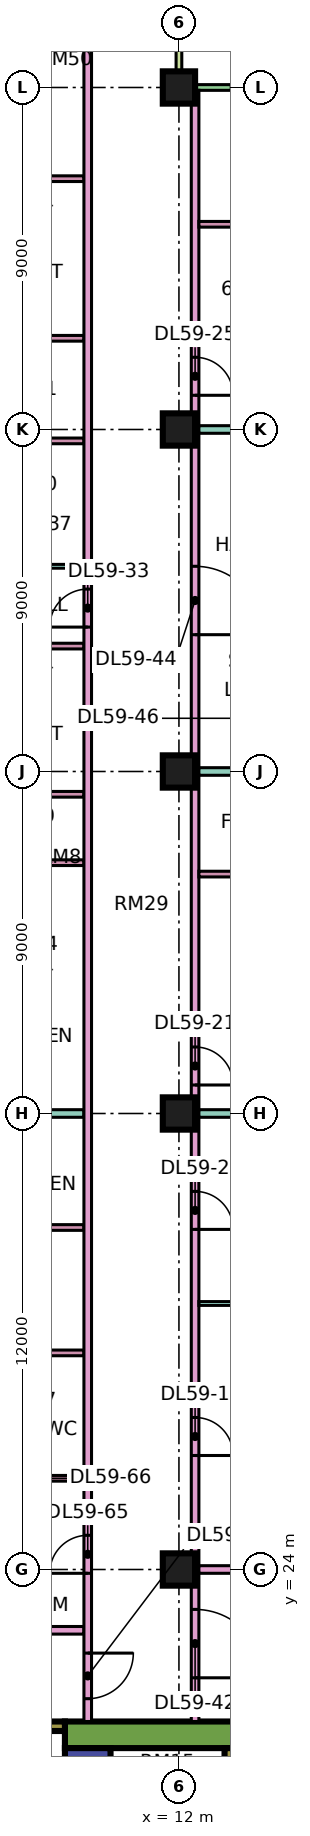
"""IFC4 building model, lengths in metres.
Left out: names, types, materials, properties, quantities, classifications, styles, units other than length and angle.
Written with IfcOpenShell. Run it as: python <this file> out.ifc"""

import sys

from ifc_helpers import new_model, si_unit, direction, frame, frame_2d, origin, origin_2d, place, context, subcontext, project, spatial, rectangle, extrude, element, fill, save


model = new_model("IFC4")
c1 = context("Model", 3, precision=1e-05, world=origin(), true_north=direction((0.0, 1.0)))
c2 = subcontext(c1, "Body", "Model", "MODEL_VIEW")
j1 = project(units=[si_unit("LENGTHUNIT", "METRE"), si_unit("PLANEANGLEUNIT", "RADIAN")], contexts=[c1])
p1 = place(None, origin())
s1 = spatial("IfcSite", under=j1, at=p1, CompositionType="ELEMENT")
p2 = place(p1, origin())
s2 = spatial("IfcBuilding", under=s1, at=p2, CompositionType="ELEMENT")
p3 = place(p2, frame((0.0, 0.0, 249.15)))
s3 = spatial("IfcBuildingStorey", under=s2, at=p3, CompositionType="ELEMENT", Elevation=249.15)
for number, where, z_axis, x_axis in (
    (1, (12.0, 24.0, 0.0), (0.0, 0.0, 1.0), (1.0, 0.0, 0.0)),
    (2, (12.0, 36.0, 0.0), (0.0, 0.0, 1.0), (1.0, 0.0, 0.0)),
    (3, (12.0, 45.0, 0.0), (0.0, 0.0, 1.0), (1.0, 0.0, 0.0)),
    (4, (12.0, 54.0, 0.0), (0.0, 0.0, 1.0), (1.0, 0.0, 0.0)),
    (5, (12.0, 63.0, 0.0), (0.0, 0.0, 1.0), (1.0, 0.0, 0.0)),
):
    element("IfcColumn", number, at=place(p3, frame(where, z_axis=z_axis, x_axis=x_axis)), inside=s3, PredefinedType="COLUMN", context=c2, shape_type="SweptSolid", body=[
        extrude(rectangle(XDim=0.85, YDim=0.85, at=origin_2d()), origin(), (0.0, 0.0, 1.0), 3.75),
    ])
p4 = place(p3, frame((9.0, 19.65, 0.0), z_axis=(0.0, 0.0, 1.0), x_axis=(1.0, 0.0, 0.0)))
e6 = element("IfcWall", 6, at=p4, inside=s3, PredefinedType="SHEAR", context=c2, shape_type="SweptSolid", body=[
    extrude(rectangle(XDim=25.0, YDim=0.7, at=frame_2d((12.5, 0.0))), origin(), (0.0, 0.0, 1.0), 3.75),
])
p5 = place(p4, frame((19.1, 0.0, 0.0)))
e7 = element("IfcOpeningElement", 7, at=p5, cuts=e6, PredefinedType="OPENING", context=c2, shape_type="SweptSolid", body=[
    extrude(rectangle(XDim=1.8, YDim=2.4, at=frame_2d((0.9, 1.2))), frame((0.0, 0.36, 0.0), z_axis=(0.0, -1.0, 0.0), x_axis=(1.0, 0.0, 0.0)), (0.0, 0.0, 1.0), 0.72),
])
p6 = place(p3, frame((9.6, 7.7, 0.0), z_axis=(0.0, 0.0, 1.0), x_axis=(0.0, 1.0, 0.0)))
e8 = element("IfcWall", 8, at=p6, inside=s3, PredefinedType="SHEAR", context=c2, shape_type="SweptSolid", body=[
    extrude(rectangle(XDim=11.6, YDim=1.2, at=frame_2d((5.8, 0.0))), origin(), (0.0, 0.0, 1.0), 3.75),
])
p7 = place(p6, frame((4.175, 0.0, 0.0)))
e9 = element("IfcOpeningElement", 9, at=p7, cuts=e8, PredefinedType="OPENING", context=c2, shape_type="SweptSolid", body=[
    extrude(rectangle(XDim=1.1, YDim=2.2, at=frame_2d((0.55, 1.1))), frame((0.0, 0.61, 0.0), z_axis=(0.0, -1.0, 0.0), x_axis=(1.0, 0.0, 0.0)), (0.0, 0.0, 1.0), 1.22),
])
p8 = place(p6, frame((6.675, 0.0, 0.0)))
e10 = element("IfcOpeningElement", 10, at=p8, cuts=e8, PredefinedType="OPENING", context=c2, shape_type="SweptSolid", body=[
    extrude(rectangle(XDim=1.1, YDim=2.2, at=frame_2d((0.55, 1.1))), frame((0.0, 0.61, 0.0), z_axis=(0.0, -1.0, 0.0), x_axis=(1.0, 0.0, 0.0)), (0.0, 0.0, 1.0), 1.22),
])
p9 = place(p6, frame((9.55, 0.0, 0.0)))
e11 = element("IfcOpeningElement", 11, at=p9, cuts=e8, PredefinedType="OPENING", context=c2, shape_type="SweptSolid", body=[
    extrude(rectangle(XDim=1.1, YDim=2.2, at=frame_2d((0.55, 1.1))), frame((0.0, 0.61, 0.0), z_axis=(0.0, -1.0, 0.0), x_axis=(1.0, 0.0, 0.0)), (0.0, 0.0, 1.0), 1.22),
])
p10 = place(p6, frame((1.85, 0.0, 0.0)))
e12 = element("IfcOpeningElement", 12, at=p10, cuts=e8, PredefinedType="OPENING", context=c2, shape_type="SweptSolid", body=[
    extrude(rectangle(XDim=0.9, YDim=2.1, at=frame_2d((0.45, 1.05))), frame((0.0, 0.61, 0.0), z_axis=(0.0, -1.0, 0.0), x_axis=(1.0, 0.0, 0.0)), (0.0, 0.0, 1.0), 1.22),
])
p11 = place(p3, frame((13.325, 7.7, 0.0), z_axis=(0.0, 0.0, 1.0), x_axis=(0.0, 1.0, 0.0)))
e13 = element("IfcWall", 13, at=p11, inside=s3, PredefinedType="SHEAR", context=c2, shape_type="SweptSolid", body=[
    extrude(rectangle(XDim=11.6, YDim=0.25, at=frame_2d((5.8, 0.0))), origin(), (0.0, 0.0, 1.0), 3.75),
])
p12 = place(p3, frame((2.1, 19.875, 0.0), z_axis=(0.0, 0.0, 1.0), x_axis=(1.0, 0.0, 0.0)))
e14 = element("IfcWall", 14, at=p12, inside=s3, PredefinedType="SHEAR", context=c2, shape_type="SweptSolid", body=[
    extrude(rectangle(XDim=6.9, YDim=0.25, at=frame_2d((3.45, 0.0))), origin(), (0.0, 0.0, 1.0), 3.75),
])
p13 = place(p12, frame((1.175, 0.0, 0.0)))
e15 = element("IfcOpeningElement", 15, at=p13, cuts=e14, PredefinedType="OPENING", context=c2, shape_type="SweptSolid", body=[
    extrude(rectangle(XDim=1.1, YDim=2.2, at=frame_2d((0.55, 1.1))), frame((0.0, 0.135, 0.0), z_axis=(0.0, -1.0, 0.0), x_axis=(1.0, 0.0, 0.0)), (0.0, 0.0, 1.0), 0.27),
])
p14 = place(p12, frame((4.6, 0.0, 0.0)))
e16 = element("IfcOpeningElement", 16, at=p14, cuts=e14, PredefinedType="OPENING", context=c2, shape_type="SweptSolid", body=[
    extrude(rectangle(XDim=1.2, YDim=2.2, at=frame_2d((0.6, 1.1))), frame((0.0, 0.135, 0.0), z_axis=(0.0, -1.0, 0.0), x_axis=(1.0, 0.0, 0.0)), (0.0, 0.0, 1.0), 0.27),
])
p15 = place(p3, frame((22.425, 63.0, 0.0), z_axis=(0.0, 0.0, 1.0), x_axis=(-1.0, 0.0, 0.0)))
e17 = element("IfcWall", 17, at=p15, inside=s3, PredefinedType="SOLIDWALL", context=c2, shape_type="SweptSolid", body=[
    extrude(rectangle(XDim=10.35, YDim=0.15, at=frame_2d((5.175, 0.0))), origin(), (0.0, 0.0, 1.0), 3.35),
])
p16 = place(p15, frame((1.7, 0.0, 0.0)))
e18 = element("IfcOpeningElement", 18, at=p16, cuts=e17, PredefinedType="OPENING", context=c2, shape_type="SweptSolid", body=[
    extrude(rectangle(XDim=1.8, YDim=2.4, at=frame_2d((0.9, 1.2))), frame((0.0, 0.085, 0.0), z_axis=(0.0, -1.0, 0.0), x_axis=(1.0, 0.0, 0.0)), (0.0, 0.0, 1.0), 0.17),
])
p17 = place(p15, frame((6.05, 0.0, 0.45)))
e19 = element("IfcOpeningElement", 19, at=p17, cuts=e17, PredefinedType="OPENING", context=c2, shape_type="SweptSolid", body=[
    extrude(rectangle(XDim=3.0, YDim=2.4, at=frame_2d((1.5, 1.2))), frame((0.0, 0.085, 0.0), z_axis=(0.0, -1.0, 0.0), x_axis=(1.0, 0.0, 0.0)), (0.0, 0.0, 1.0), 0.17),
])
p18 = place(p3, frame((12.0, 64.5, 0.0), z_axis=(0.0, 0.0, 1.0), x_axis=(0.0, -1.0, 0.0)))
e20 = element("IfcWall", 20, at=p18, inside=s3, PredefinedType="SOLIDWALL", context=c2, shape_type="SweptSolid", body=[
    extrude(rectangle(XDim=1.5, YDim=0.15, at=frame_2d((0.75, 0.0))), origin(), (0.0, 0.0, 1.0), 3.35),
])
p19 = place(p3, frame((0.074, 22.4, 0.0), z_axis=(0.0, 0.0, 1.0), x_axis=(1.0, 0.0, 0.0)))
e21 = element("IfcWall", 21, at=p19, inside=s3, PredefinedType="PARTITIONING", context=c2, shape_type="SweptSolid", body=[
    extrude(rectangle(XDim=9.426, YDim=0.2, at=frame_2d((4.713, 0.0))), origin(), (0.0, 0.0, 1.0), 3.35),
])
p20 = place(p3, frame((6.375, 26.4, 0.0), z_axis=(0.0, 0.0, 1.0), x_axis=(1.0, 0.0, 0.0)))
e22 = element("IfcWall", 22, at=p20, inside=s3, PredefinedType="PARTITIONING", context=c2, shape_type="SweptSolid", body=[
    extrude(rectangle(XDim=3.125, YDim=0.15, at=frame_2d((1.562, 0.0))), origin(), (0.0, 0.0, 1.0), 3.35),
])
p21 = place(p20, frame((1.225, 0.0, 0.0)))
e23 = element("IfcOpeningElement", 23, at=p21, cuts=e22, PredefinedType="OPENING", context=c2, shape_type="SweptSolid", body=[
    extrude(rectangle(XDim=0.8, YDim=2.1, at=frame_2d((0.4, 1.05))), frame((0.0, 0.085, 0.0), z_axis=(0.0, -1.0, 0.0), x_axis=(1.0, 0.0, 0.0)), (0.0, 0.0, 1.0), 0.17),
])
for number, where, z_axis, x_axis in (
    (24, (6.375, 29.7, 0.0), (0.0, 0.0, 1.0), (1.0, 0.0, 0.0)),
    (25, (6.375, 33.0, 0.0), (0.0, 0.0, 1.0), (1.0, 0.0, 0.0)),
):
    element("IfcWall", number, at=place(p3, frame(where, z_axis=z_axis, x_axis=x_axis)), inside=s3, PredefinedType="PARTITIONING", context=c2, shape_type="SweptSolid", body=[
        extrude(rectangle(XDim=3.125, YDim=0.15, at=frame_2d((1.562, 0.0))), origin(), (0.0, 0.0, 1.0), 3.35),
    ])
p22 = place(p3, frame((6.525, 36.0, 0.0), z_axis=(0.0, 0.0, 1.0), x_axis=(1.0, 0.0, 0.0)))
e26 = element("IfcWall", 26, at=p22, inside=s3, PredefinedType="PARTITIONING", context=c2, shape_type="SweptSolid", body=[
    extrude(rectangle(XDim=2.975, YDim=0.2, at=frame_2d((1.488, 0.0))), origin(), (0.0, 0.0, 1.0), 3.35),
])
for number, where, z_axis, x_axis in (
    (27, (6.675, 42.6, 0.0), (0.0, 0.0, 1.0), (1.0, 0.0, 0.0)),
    (28, (6.675, 44.4, 0.0), (0.0, 0.0, 1.0), (1.0, 0.0, 0.0)),
    (29, (6.675, 48.3, 0.0), (0.0, 0.0, 1.0), (1.0, 0.0, 0.0)),
):
    element("IfcWall", number, at=place(p3, frame(where, z_axis=z_axis, x_axis=x_axis)), inside=s3, PredefinedType="PARTITIONING", context=c2, shape_type="SweptSolid", body=[
        extrude(rectangle(XDim=2.825, YDim=0.15, at=frame_2d((1.413, 0.0))), origin(), (0.0, 0.0, 1.0), 3.35),
    ])
p23 = place(p3, frame((6.675, 50.4, 0.0), z_axis=(0.0, 0.0, 1.0), x_axis=(1.0, 0.0, 0.0)))
e30 = element("IfcWall", 30, at=p23, inside=s3, PredefinedType="PARTITIONING", context=c2, shape_type="SweptSolid", body=[
    extrude(rectangle(XDim=2.825, YDim=0.1, at=frame_2d((1.413, 0.0))), origin(), (0.0, 0.0, 1.0), 3.35),
])
p24 = place(p23, frame((0.975, 0.0, 0.0)))
e31 = element("IfcOpeningElement", 31, at=p24, cuts=e30, PredefinedType="OPENING", context=c2, shape_type="SweptSolid", body=[
    extrude(rectangle(XDim=0.9, YDim=2.1, at=frame_2d((0.45, 1.05))), frame((0.0, 0.06, 0.0), z_axis=(0.0, -1.0, 0.0), x_axis=(1.0, 0.0, 0.0)), (0.0, 0.0, 1.0), 0.12),
])
for number, where, z_axis, x_axis in (
    (32, (6.675, 53.7, 0.0), (0.0, 0.0, 1.0), (1.0, 0.0, 0.0)),
    (33, (6.675, 56.4, 0.0), (0.0, 0.0, 1.0), (1.0, 0.0, 0.0)),
    (34, (6.675, 60.6, 0.0), (0.0, 0.0, 1.0), (1.0, 0.0, 0.0)),
):
    element("IfcWall", number, at=place(p3, frame(where, z_axis=z_axis, x_axis=x_axis)), inside=s3, PredefinedType="PARTITIONING", context=c2, shape_type="SweptSolid", body=[
        extrude(rectangle(XDim=2.825, YDim=0.15, at=frame_2d((1.413, 0.0))), origin(), (0.0, 0.0, 1.0), 3.35),
    ])
p25 = place(p3, frame((9.6, 20.0, 0.0), z_axis=(0.0, 0.0, 1.0), x_axis=(0.0, 1.0, 0.0)))
e35 = element("IfcWall", 35, at=p25, inside=s3, PredefinedType="PARTITIONING", context=c2, shape_type="SweptSolid", body=[
    extrude(rectangle(XDim=44.35, YDim=0.2, at=frame_2d((22.175, 0.0))), origin(), (0.0, 0.0, 1.0), 3.35),
])
p26 = place(p25, frame((28.8, 0.0, 0.0)))
e36 = element("IfcOpeningElement", 36, at=p26, cuts=e35, PredefinedType="OPENING", context=c2, shape_type="SweptSolid", body=[
    extrude(rectangle(XDim=1.0, YDim=2.1, at=frame_2d((0.5, 1.05))), frame((0.0, 0.11, 0.0), z_axis=(0.0, -1.0, 0.0), x_axis=(1.0, 0.0, 0.0)), (0.0, 0.0, 1.0), 0.22),
])
p27 = place(p25, frame((0.6, 0.0, 0.0)))
e37 = element("IfcOpeningElement", 37, at=p27, cuts=e35, PredefinedType="OPENING", context=c2, shape_type="SweptSolid", body=[
    extrude(rectangle(XDim=1.2, YDim=2.1, at=frame_2d((0.6, 1.05))), frame((0.0, 0.11, 0.0), z_axis=(0.0, -1.0, 0.0), x_axis=(1.0, 0.0, 0.0)), (0.0, 0.0, 1.0), 0.22),
])
p28 = place(p25, frame((3.9, 0.0, 0.0)))
e38 = element("IfcOpeningElement", 38, at=p28, cuts=e35, PredefinedType="OPENING", context=c2, shape_type="SweptSolid", body=[
    extrude(rectangle(XDim=1.0, YDim=2.1, at=frame_2d((0.5, 1.05))), frame((0.0, 0.11, 0.0), z_axis=(0.0, -1.0, 0.0), x_axis=(1.0, 0.0, 0.0)), (0.0, 0.0, 1.0), 0.22),
])
p29 = place(p3, frame((12.425, 20.0, 0.0), z_axis=(0.0, 0.0, 1.0), x_axis=(0.0, 1.0, 0.0)))
e39 = element("IfcWall", 39, at=p29, inside=s3, PredefinedType="PARTITIONING", context=c2, shape_type="SweptSolid", body=[
    extrude(rectangle(XDim=42.926, YDim=0.2, at=frame_2d((21.463, 0.0))), origin(), (0.0, 0.0, 1.0), 3.35),
])
p30 = place(p29, frame((7.0, 0.0, 0.0)))
e40 = element("IfcOpeningElement", 40, at=p30, cuts=e39, PredefinedType="OPENING", context=c2, shape_type="SweptSolid", body=[
    extrude(rectangle(XDim=1.0, YDim=2.1, at=frame_2d((0.5, 1.05))), frame((0.0, 0.11, 0.0), z_axis=(0.0, -1.0, 0.0), x_axis=(1.0, 0.0, 0.0)), (0.0, 0.0, 1.0), 0.22),
])
p31 = place(p29, frame((12.95, 0.0, 0.0)))
e41 = element("IfcOpeningElement", 41, at=p31, cuts=e39, PredefinedType="OPENING", context=c2, shape_type="SweptSolid", body=[
    extrude(rectangle(XDim=1.0, YDim=2.1, at=frame_2d((0.5, 1.05))), frame((0.0, 0.11, 0.0), z_axis=(0.0, -1.0, 0.0), x_axis=(1.0, 0.0, 0.0)), (0.0, 0.0, 1.0), 0.22),
])
p32 = place(p29, frame((16.75, 0.0, 0.0)))
e42 = element("IfcOpeningElement", 42, at=p32, cuts=e39, PredefinedType="OPENING", context=c2, shape_type="SweptSolid", body=[
    extrude(rectangle(XDim=1.0, YDim=2.1, at=frame_2d((0.5, 1.05))), frame((0.0, 0.11, 0.0), z_axis=(0.0, -1.0, 0.0), x_axis=(1.0, 0.0, 0.0)), (0.0, 0.0, 1.0), 0.22),
])
p33 = place(p29, frame((34.9, 0.0, 0.0)))
e43 = element("IfcOpeningElement", 43, at=p33, cuts=e39, PredefinedType="OPENING", context=c2, shape_type="SweptSolid", body=[
    extrude(rectangle(XDim=1.0, YDim=2.1, at=frame_2d((0.5, 1.05))), frame((0.0, 0.11, 0.0), z_axis=(0.0, -1.0, 0.0), x_axis=(1.0, 0.0, 0.0)), (0.0, 0.0, 1.0), 0.22),
])
p34 = place(p29, frame((1.15, 0.0, 0.0)))
e44 = element("IfcOpeningElement", 44, at=p34, cuts=e39, PredefinedType="OPENING", context=c2, shape_type="SweptSolid", body=[
    extrude(rectangle(XDim=1.8, YDim=2.1, at=frame_2d((0.9, 1.05))), frame((0.0, 0.11, 0.0), z_axis=(0.0, -1.0, 0.0), x_axis=(1.0, 0.0, 0.0)), (0.0, 0.0, 1.0), 0.22),
])
p35 = place(p29, frame((28.6, 0.0, 0.0)))
e45 = element("IfcOpeningElement", 45, at=p35, cuts=e39, PredefinedType="OPENING", context=c2, shape_type="SweptSolid", body=[
    extrude(rectangle(XDim=1.8, YDim=2.1, at=frame_2d((0.9, 1.05))), frame((0.0, 0.11, 0.0), z_axis=(0.0, -1.0, 0.0), x_axis=(1.0, 0.0, 0.0)), (0.0, 0.0, 1.0), 0.22),
])
p36 = place(p3, frame((12.525, 24.0, 0.0), z_axis=(0.0, 0.0, 1.0), x_axis=(1.0, 0.0, 0.0)))
e46 = element("IfcWall", 46, at=p36, inside=s3, PredefinedType="PARTITIONING", context=c2, shape_type="SweptSolid", body=[
    extrude(rectangle(XDim=8.975, YDim=0.2, at=frame_2d((4.488, 0.0))), origin(), (0.0, 0.0, 1.0), 3.35),
])
p37 = place(p3, frame((12.525, 31.0, 0.0), z_axis=(0.0, 0.0, 1.0), x_axis=(1.0, 0.0, 0.0)))
e47 = element("IfcWall", 47, at=p37, inside=s3, PredefinedType="PARTITIONING", context=c2, shape_type="SweptSolid", body=[
    extrude(rectangle(XDim=8.975, YDim=0.1, at=frame_2d((4.488, 0.0))), origin(), (0.0, 0.0, 1.0), 3.35),
])
p38 = place(p3, frame((12.525, 36.0, 0.0), z_axis=(0.0, 0.0, 1.0), x_axis=(1.0, 0.0, 0.0)))
e48 = element("IfcWall", 48, at=p38, inside=s3, PredefinedType="PARTITIONING", context=c2, shape_type="SweptSolid", body=[
    extrude(rectangle(XDim=11.475, YDim=0.2, at=frame_2d((5.738, 0.0))), origin(), (0.0, 0.0, 1.0), 3.35),
])
for number, where, z_axis, x_axis in (
    (49, (12.525, 38.4, 0.0), (0.0, 0.0, 1.0), (1.0, 0.0, 0.0)),
    (50, (12.525, 42.3, 0.0), (0.0, 0.0, 1.0), (1.0, 0.0, 0.0)),
):
    element("IfcWall", number, at=place(p3, frame(where, z_axis=z_axis, x_axis=x_axis)), inside=s3, PredefinedType="PARTITIONING", context=c2, shape_type="SweptSolid", body=[
        extrude(rectangle(XDim=5.225, YDim=0.15, at=frame_2d((2.613, 0.0))), origin(), (0.0, 0.0, 1.0), 3.35),
    ])
p39 = place(p3, frame((12.525, 45.0, 0.0), z_axis=(0.0, 0.0, 1.0), x_axis=(1.0, 0.0, 0.0)))
e51 = element("IfcWall", 51, at=p39, inside=s3, PredefinedType="PARTITIONING", context=c2, shape_type="SweptSolid", body=[
    extrude(rectangle(XDim=11.401, YDim=0.2, at=frame_2d((5.701, 0.0))), origin(), (0.0, 0.0, 1.0), 3.35),
])
p40 = place(p3, frame((12.525, 54.0, 0.0), z_axis=(0.0, 0.0, 1.0), x_axis=(1.0, 0.0, 0.0)))
e52 = element("IfcWall", 52, at=p40, inside=s3, PredefinedType="PARTITIONING", context=c2, shape_type="SweptSolid", body=[
    extrude(rectangle(XDim=11.475, YDim=0.2, at=frame_2d((5.738, 0.0))), origin(), (0.0, 0.0, 1.0), 3.35),
])
for number, where, z_axis, x_axis in (
    (53, (12.525, 56.7, 0.0), (0.0, 0.0, 1.0), (1.0, 0.0, 0.0)),
    (54, (12.525, 59.4, 0.0), (0.0, 0.0, 1.0), (1.0, 0.0, 0.0)),
):
    element("IfcWall", number, at=place(p3, frame(where, z_axis=z_axis, x_axis=x_axis)), inside=s3, PredefinedType="PARTITIONING", context=c2, shape_type="SweptSolid", body=[
        extrude(rectangle(XDim=4.625, YDim=0.15, at=frame_2d((2.312, 0.0))), origin(), (0.0, 0.0, 1.0), 3.35),
    ])
p41 = place(p30, frame((1.0, 0.0, 0.0), z_axis=(0.0, 0.0, 1.0), x_axis=(-1.0, 0.0, 0.0)))
e55 = element("IfcDoor", 55, at=p41, inside=s3, OperationType="SINGLE_SWING_LEFT", PredefinedType="DOOR", context=c2, shape_type="SweptSolid", body=[
    extrude(rectangle(XDim=1.0, YDim=2.1, at=frame_2d((0.5, 1.05))), frame((0.0, 0.025, 0.0), z_axis=(0.0, -1.0, 0.0), x_axis=(1.0, 0.0, 0.0)), (0.0, 0.0, 1.0), 0.05),
])
fill(e40, e55)
p42 = place(p31, frame((1.0, 0.0, 0.0), z_axis=(0.0, 0.0, 1.0), x_axis=(-1.0, 0.0, 0.0)))
e56 = element("IfcDoor", 56, at=p42, inside=s3, OperationType="SINGLE_SWING_LEFT", PredefinedType="DOOR", context=c2, shape_type="SweptSolid", body=[
    extrude(rectangle(XDim=1.0, YDim=2.1, at=frame_2d((0.5, 1.05))), frame((0.0, 0.025, 0.0), z_axis=(0.0, -1.0, 0.0), x_axis=(1.0, 0.0, 0.0)), (0.0, 0.0, 1.0), 0.05),
])
fill(e41, e56)
p43 = place(p32, frame((1.0, 0.0, 0.0), z_axis=(0.0, 0.0, 1.0), x_axis=(-1.0, 0.0, 0.0)))
e57 = element("IfcDoor", 57, at=p43, inside=s3, OperationType="SINGLE_SWING_LEFT", PredefinedType="DOOR", context=c2, shape_type="SweptSolid", body=[
    extrude(rectangle(XDim=1.0, YDim=2.1, at=frame_2d((0.5, 1.05))), frame((0.0, 0.025, 0.0), z_axis=(0.0, -1.0, 0.0), x_axis=(1.0, 0.0, 0.0)), (0.0, 0.0, 1.0), 0.05),
])
fill(e42, e57)
p44 = place(p33, frame((1.0, 0.0, 0.0), z_axis=(0.0, 0.0, 1.0), x_axis=(-1.0, 0.0, 0.0)))
e58 = element("IfcDoor", 58, at=p44, inside=s3, OperationType="SINGLE_SWING_LEFT", PredefinedType="DOOR", context=c2, shape_type="SweptSolid", body=[
    extrude(rectangle(XDim=1.0, YDim=2.1, at=frame_2d((0.5, 1.05))), frame((0.0, 0.025, 0.0), z_axis=(0.0, -1.0, 0.0), x_axis=(1.0, 0.0, 0.0)), (0.0, 0.0, 1.0), 0.05),
])
fill(e43, e58)
p45 = place(p26, origin())
e59 = element("IfcDoor", 59, at=p45, inside=s3, OperationType="SINGLE_SWING_LEFT", PredefinedType="DOOR", context=c2, shape_type="SweptSolid", body=[
    extrude(rectangle(XDim=1.0, YDim=2.1, at=frame_2d((0.5, 1.05))), frame((0.0, 0.025, 0.0), z_axis=(0.0, -1.0, 0.0), x_axis=(1.0, 0.0, 0.0)), (0.0, 0.0, 1.0), 0.05),
])
fill(e36, e59)
p46 = place(p34, frame((1.8, 0.0, 0.0), z_axis=(0.0, 0.0, 1.0), x_axis=(-1.0, 0.0, 0.0)))
e60 = element("IfcDoor", 60, at=p46, inside=s3, OperationType="DOUBLE_DOOR_SINGLE_SWING", PredefinedType="DOOR", context=c2, shape_type="SweptSolid", body=[
    extrude(rectangle(XDim=1.8, YDim=2.1, at=frame_2d((0.9, 1.05))), frame((0.0, 0.025, 0.0), z_axis=(0.0, -1.0, 0.0), x_axis=(1.0, 0.0, 0.0)), (0.0, 0.0, 1.0), 0.05),
])
fill(e44, e60)
p47 = place(p27, origin())
e61 = element("IfcDoor", 61, at=p47, inside=s3, OperationType="SINGLE_SWING_RIGHT", PredefinedType="DOOR", context=c2, shape_type="SweptSolid", body=[
    extrude(rectangle(XDim=1.2, YDim=2.1, at=frame_2d((0.6, 1.05))), frame((0.0, 0.025, 0.0), z_axis=(0.0, -1.0, 0.0), x_axis=(1.0, 0.0, 0.0)), (0.0, 0.0, 1.0), 0.05),
])
fill(e37, e61)
p48 = place(p35, frame((1.8, 0.0, 0.0), z_axis=(0.0, 0.0, 1.0), x_axis=(-1.0, 0.0, 0.0)))
e62 = element("IfcDoor", 62, at=p48, inside=s3, OperationType="DOUBLE_DOOR_SINGLE_SWING", PredefinedType="DOOR", context=c2, shape_type="SweptSolid", body=[
    extrude(rectangle(XDim=1.8, YDim=2.1, at=frame_2d((0.9, 1.05))), frame((0.0, 0.025, 0.0), z_axis=(0.0, -1.0, 0.0), x_axis=(1.0, 0.0, 0.0)), (0.0, 0.0, 1.0), 0.05),
])
fill(e45, e62)
p49 = place(p28, origin())
e63 = element("IfcDoor", 63, at=p49, inside=s3, OperationType="SINGLE_SWING_LEFT", PredefinedType="DOOR", context=c2, shape_type="SweptSolid", body=[
    extrude(rectangle(XDim=1.0, YDim=2.1, at=frame_2d((0.5, 1.05))), frame((0.0, 0.025, 0.0), z_axis=(0.0, -1.0, 0.0), x_axis=(1.0, 0.0, 0.0)), (0.0, 0.0, 1.0), 0.05),
])
fill(e38, e63)
save(model, sys.argv[1])
